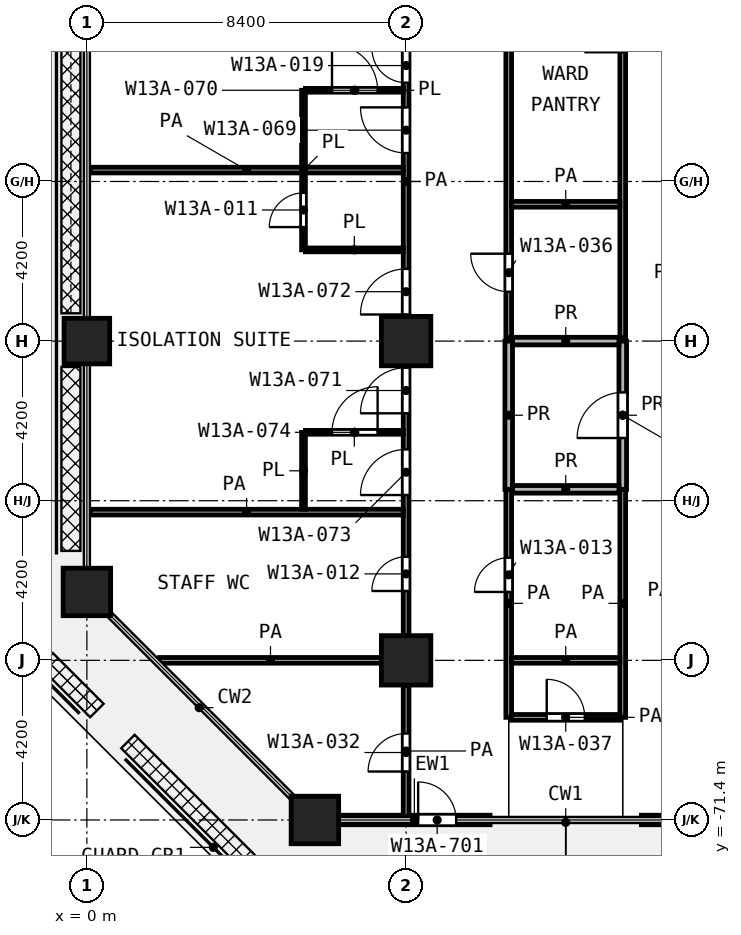
"""IFC4 building model, lengths in metres.
Left out: names, types, materials, properties, quantities, classifications, styles, units other than length and angle.
Written with IfcOpenShell. Run it as: python <this file> out.ifc"""

import sys

from ifc_helpers import new_model, si_unit, direction, frame, frame_2d, origin, origin_2d, place, context, subcontext, project, spatial, rectangle, extrude, element, fill, save


model = new_model("IFC4")
c1 = context("Model", 3, precision=1e-05, world=origin(), true_north=direction((0.0, 1.0)))
c2 = subcontext(c1, "Body", "Model", "MODEL_VIEW")
j1 = project(units=[si_unit("LENGTHUNIT", "METRE"), si_unit("PLANEANGLEUNIT", "RADIAN")], contexts=[c1])
p1 = place(None, origin())
s1 = spatial("IfcSite", under=j1, at=p1, CompositionType="ELEMENT")
p2 = place(p1, origin())
s2 = spatial("IfcBuilding", under=s1, at=p2, CompositionType="ELEMENT")
p3 = place(p2, frame((0.0, 0.0, 60.2)))
s3 = spatial("IfcBuildingStorey", under=s2, at=p3, CompositionType="ELEMENT", Elevation=60.2)
p4 = place(p3, frame((0.0, -58.8, 0.0), z_axis=(0.0, 0.0, 1.0), x_axis=(1.0, 0.0, 0.0)))
e1 = element("IfcColumn", 1, at=p4, inside=s3, PredefinedType="COLUMN", context=c2, shape_type="SweptSolid", body=[
    extrude(rectangle(XDim=1.2, YDim=1.2, at=origin_2d()), origin(), (0.0, 0.0, 1.0), 4.2),
])
p5 = place(p3, frame((8.4, -58.8, 0.0), z_axis=(0.0, 0.0, 1.0), x_axis=(1.0, 0.0, 0.0)))
e2 = element("IfcColumn", 2, at=p5, inside=s3, PredefinedType="COLUMN", context=c2, shape_type="SweptSolid", body=[
    extrude(rectangle(XDim=1.3, YDim=1.3, at=origin_2d()), origin(), (0.0, 0.0, 1.0), 4.2),
])
p6 = place(p3, frame((0.0, -65.4, 0.0), z_axis=(0.0, 0.0, 1.0), x_axis=(1.0, 0.0, 0.0)))
e3 = element("IfcColumn", 3, at=p6, inside=s3, PredefinedType="COLUMN", context=c2, shape_type="SweptSolid", body=[
    extrude(rectangle(XDim=1.25, YDim=1.25, at=origin_2d()), origin(), (0.0, 0.0, 1.0), 4.2),
])
p7 = place(p3, frame((8.4, -67.2, 0.0), z_axis=(0.0, 0.0, 1.0), x_axis=(1.0, 0.0, 0.0)))
e4 = element("IfcColumn", 4, at=p7, inside=s3, PredefinedType="COLUMN", context=c2, shape_type="SweptSolid", body=[
    extrude(rectangle(XDim=1.3, YDim=1.3, at=origin_2d()), origin(), (0.0, 0.0, 1.0), 4.2),
])
p8 = place(p3, frame((6.0, -71.4, 0.0), z_axis=(0.0, 0.0, 1.0), x_axis=(1.0, 0.0, 0.0)))
e5 = element("IfcColumn", 5, at=p8, inside=s3, PredefinedType="COLUMN", context=c2, shape_type="SweptSolid", body=[
    extrude(rectangle(XDim=1.25, YDim=1.25, at=origin_2d()), origin(), (0.0, 0.0, 1.0), 4.2),
])
p9 = place(p3, frame((6.625, -71.4, 0.0), z_axis=(0.0, 0.0, 1.0), x_axis=(1.0, 0.0, 0.0)))
e6 = element("IfcWall", 6, at=p9, inside=s3, PredefinedType="SOLIDWALL", context=c2, shape_type="SweptSolid", body=[
    extrude(rectangle(XDim=3.983, YDim=0.25, at=frame_2d((1.992, 0.0))), origin(), (0.0, 0.0, 1.0), 3.78),
])
p10 = place(p9, frame((2.092, 0.0, 0.0)))
e7 = element("IfcOpeningElement", 7, at=p10, cuts=e6, PredefinedType="OPENING", context=c2, shape_type="SweptSolid", body=[
    extrude(rectangle(XDim=1.0, YDim=2.1, at=frame_2d((0.5, 1.05))), frame((0.0, 0.135, 0.0), z_axis=(0.0, -1.0, 0.0), x_axis=(1.0, 0.0, 0.0)), (0.0, 0.0, 1.0), 0.27),
])
p11 = place(p3, frame((14.592, -71.4, 0.0), z_axis=(0.0, 0.0, 1.0), x_axis=(1.0, 0.0, 0.0)))
e8 = element("IfcWall", 8, at=p11, inside=s3, PredefinedType="SOLIDWALL", context=c2, shape_type="SweptSolid", body=[
    extrude(rectangle(XDim=3.983, YDim=0.25, at=frame_2d((1.992, 0.0))), origin(), (0.0, 0.0, 1.0), 3.78),
])
p12 = place(p11, frame((0.892, 0.0, 0.0)))
e9 = element("IfcOpeningElement", 9, at=p12, cuts=e8, PredefinedType="OPENING", context=c2, shape_type="SweptSolid", body=[
    extrude(rectangle(XDim=1.0, YDim=2.1, at=frame_2d((0.5, 1.05))), frame((0.0, 0.135, 0.0), z_axis=(0.0, -1.0, 0.0), x_axis=(1.0, 0.0, 0.0)), (0.0, 0.0, 1.0), 0.27),
])
p13 = place(p3, frame((5.75, -61.2, 0.0), z_axis=(0.0, 0.0, 1.0), x_axis=(1.0, 0.0, 0.0)))
e10 = element("IfcWall", 10, at=p13, inside=s3, PredefinedType="PARTITIONING", context=c2, shape_type="SweptSolid", body=[
    extrude(rectangle(XDim=2.575, YDim=0.1, at=frame_2d((1.288, 0.0))), origin(), (0.0, 0.0, 1.0), 3.9),
])
p14 = place(p13, frame((0.7, 0.0, 0.0)))
e11 = element("IfcOpeningElement", 11, at=p14, cuts=e10, PredefinedType="OPENING", context=c2, shape_type="SweptSolid", body=[
    extrude(rectangle(XDim=1.2, YDim=2.1, at=frame_2d((0.6, 1.05))), frame((0.0, 0.06, 0.0), z_axis=(0.0, -1.0, 0.0), x_axis=(1.0, 0.0, 0.0)), (0.0, 0.0, 1.0), 0.12),
])
p15 = place(p3, frame((5.75, -56.4, 0.0), z_axis=(0.0, 0.0, 1.0), x_axis=(1.0, 0.0, 0.0)))
e12 = element("IfcWall", 12, at=p15, inside=s3, PredefinedType="PARTITIONING", context=c2, shape_type="SweptSolid", body=[
    extrude(rectangle(XDim=2.575, YDim=0.1, at=frame_2d((1.288, 0.0))), origin(), (0.0, 0.0, 1.0), 3.9),
])
p16 = place(p3, frame((5.75, -52.2, 0.0), z_axis=(0.0, 0.0, 1.0), x_axis=(1.0, 0.0, 0.0)))
e13 = element("IfcWall", 13, at=p16, inside=s3, PredefinedType="PARTITIONING", context=c2, shape_type="SweptSolid", body=[
    extrude(rectangle(XDim=2.575, YDim=0.1, at=frame_2d((1.288, 0.0))), origin(), (0.0, 0.0, 1.0), 3.9),
])
p17 = place(p16, frame((0.7, 0.0, 0.0)))
e14 = element("IfcOpeningElement", 14, at=p17, cuts=e13, PredefinedType="OPENING", context=c2, shape_type="SweptSolid", body=[
    extrude(rectangle(XDim=1.2, YDim=2.1, at=frame_2d((0.6, 1.05))), frame((0.0, 0.06, 0.0), z_axis=(0.0, -1.0, 0.0), x_axis=(1.0, 0.0, 0.0)), (0.0, 0.0, 1.0), 0.12),
])
p18 = place(p3, frame((5.7, -63.225, 0.0), z_axis=(0.0, 0.0, 1.0), x_axis=(0.0, 1.0, 0.0)))
e15 = element("IfcWall", 15, at=p18, inside=s3, PredefinedType="PARTITIONING", context=c2, shape_type="SweptSolid", body=[
    extrude(rectangle(XDim=2.025, YDim=0.1, at=frame_2d((1.013, 0.0))), origin(), (0.0, 0.0, 1.0), 3.9),
])
p19 = place(p3, frame((5.7, -56.4, 0.0), z_axis=(0.0, 0.0, 1.0), x_axis=(0.0, 1.0, 0.0)))
e16 = element("IfcWall", 16, at=p19, inside=s3, PredefinedType="PARTITIONING", context=c2, shape_type="SweptSolid", body=[
    extrude(rectangle(XDim=4.2, YDim=0.1, at=frame_2d((2.1, 0.0))), origin(), (0.0, 0.0, 1.0), 3.9),
])
p20 = place(p19, frame((0.6, 0.0, 0.0)))
e17 = element("IfcOpeningElement", 17, at=p20, cuts=e16, PredefinedType="OPENING", context=c2, shape_type="SweptSolid", body=[
    extrude(rectangle(XDim=0.9, YDim=2.1, at=frame_2d((0.45, 1.05))), frame((0.0, 0.06, 0.0), z_axis=(0.0, -1.0, 0.0), x_axis=(1.0, 0.0, 0.0)), (0.0, 0.0, 1.0), 0.12),
])
p21 = place(p3, frame((11.175, -68.7, 0.0), z_axis=(0.0, 0.0, 1.0), x_axis=(1.0, 0.0, 0.0)))
e18 = element("IfcWall", 18, at=p21, inside=s3, PredefinedType="PARTITIONING", context=c2, shape_type="SweptSolid", body=[
    extrude(rectangle(XDim=2.85, YDim=0.15, at=frame_2d((1.425, 0.0))), origin(), (0.0, 0.0, 1.0), 3.9),
])
p22 = place(p21, frame((0.925, 0.0, 0.0)))
e19 = element("IfcOpeningElement", 19, at=p22, cuts=e18, PredefinedType="OPENING", context=c2, shape_type="SweptSolid", body=[
    extrude(rectangle(XDim=1.0, YDim=2.1, at=frame_2d((0.5, 1.05))), frame((0.0, 0.085, 0.0), z_axis=(0.0, -1.0, 0.0), x_axis=(1.0, 0.0, 0.0)), (0.0, 0.0, 1.0), 0.17),
])
p23 = place(p3, frame((1.913, -67.2, 0.0), z_axis=(0.0, 0.0, 1.0), x_axis=(1.0, 0.0, 0.0)))
e20 = element("IfcWall", 20, at=p23, inside=s3, PredefinedType="PARTITIONING", context=c2, shape_type="SweptSolid", body=[
    extrude(rectangle(XDim=5.837, YDim=0.15, at=frame_2d((2.918, 0.0))), origin(), (0.0, 0.0, 1.0), 3.9),
])
p24 = place(p3, frame((11.175, -67.2, 0.0), z_axis=(0.0, 0.0, 1.0), x_axis=(1.0, 0.0, 0.0)))
e21 = element("IfcWall", 21, at=p24, inside=s3, PredefinedType="PARTITIONING", context=c2, shape_type="SweptSolid", body=[
    extrude(rectangle(XDim=2.85, YDim=0.15, at=frame_2d((1.425, 0.0))), origin(), (0.0, 0.0, 1.0), 3.9),
])
p25 = place(p3, frame((0.08, -63.3, 0.0), z_axis=(0.0, 0.0, 1.0), x_axis=(1.0, 0.0, 0.0)))
e22 = element("IfcWall", 22, at=p25, inside=s3, PredefinedType="PARTITIONING", context=c2, shape_type="SweptSolid", body=[
    extrude(rectangle(XDim=8.245, YDim=0.15, at=frame_2d((4.123, 0.0))), origin(), (0.0, 0.0, 1.0), 3.9),
])
p26 = place(p3, frame((11.175, -55.2, 0.0), z_axis=(0.0, 0.0, 1.0), x_axis=(1.0, 0.0, 0.0)))
e23 = element("IfcWall", 23, at=p26, inside=s3, PredefinedType="PARTITIONING", context=c2, shape_type="SweptSolid", body=[
    extrude(rectangle(XDim=2.85, YDim=0.15, at=frame_2d((1.425, 0.0))), origin(), (0.0, 0.0, 1.0), 3.9),
])
p27 = place(p3, frame((0.08, -54.3, 0.0), z_axis=(0.0, 0.0, 1.0), x_axis=(1.0, 0.0, 0.0)))
e24 = element("IfcWall", 24, at=p27, inside=s3, PredefinedType="PARTITIONING", context=c2, shape_type="SweptSolid", body=[
    extrude(rectangle(XDim=8.245, YDim=0.15, at=frame_2d((4.123, 0.0))), origin(), (0.0, 0.0, 1.0), 3.9),
])
p28 = place(p3, frame((8.4, -71.32, 0.0), z_axis=(0.0, 0.0, 1.0), x_axis=(0.0, 1.0, 0.0)))
e25 = element("IfcWall", 25, at=p28, inside=s3, PredefinedType="PARTITIONING", context=c2, shape_type="SweptSolid", body=[
    extrude(rectangle(XDim=3.47, YDim=0.15, at=frame_2d((1.735, 0.0))), origin(), (0.0, 0.0, 1.0), 3.9),
])
p29 = place(p28, frame((1.195, 0.0, 0.0)))
e26 = element("IfcOpeningElement", 26, at=p29, cuts=e25, PredefinedType="OPENING", context=c2, shape_type="SweptSolid", body=[
    extrude(rectangle(XDim=1.0, YDim=2.1, at=frame_2d((0.5, 1.05))), frame((0.0, 0.085, 0.0), z_axis=(0.0, -1.0, 0.0), x_axis=(1.0, 0.0, 0.0)), (0.0, 0.0, 1.0), 0.17),
])
p30 = place(p3, frame((8.4, -66.55, 0.0), z_axis=(0.0, 0.0, 1.0), x_axis=(0.0, 1.0, 0.0)))
e27 = element("IfcWall", 27, at=p30, inside=s3, PredefinedType="PARTITIONING", context=c2, shape_type="SweptSolid", body=[
    extrude(rectangle(XDim=23.9, YDim=0.15, at=frame_2d((11.95, 0.0))), origin(), (0.0, 0.0, 1.0), 3.9),
])
p31 = place(p30, frame((14.55, 0.0, 0.0)))
e28 = element("IfcOpeningElement", 28, at=p31, cuts=e27, PredefinedType="OPENING", context=c2, shape_type="SweptSolid", body=[
    extrude(rectangle(XDim=0.9, YDim=2.1, at=frame_2d((0.45, 1.05))), frame((0.0, 0.085, 0.0), z_axis=(0.0, -1.0, 0.0), x_axis=(1.0, 0.0, 0.0)), (0.0, 0.0, 1.0), 0.17),
])
p32 = place(p30, frame((12.7, 0.0, 0.0)))
e29 = element("IfcOpeningElement", 29, at=p32, cuts=e27, PredefinedType="OPENING", context=c2, shape_type="SweptSolid", body=[
    extrude(rectangle(XDim=1.2, YDim=2.1, at=frame_2d((0.6, 1.05))), frame((0.0, 0.085, 0.0), z_axis=(0.0, -1.0, 0.0), x_axis=(1.0, 0.0, 0.0)), (0.0, 0.0, 1.0), 0.17),
])
p33 = place(p30, frame((5.85, 0.0, 0.0)))
e30 = element("IfcOpeningElement", 30, at=p33, cuts=e27, PredefinedType="OPENING", context=c2, shape_type="SweptSolid", body=[
    extrude(rectangle(XDim=1.2, YDim=2.1, at=frame_2d((0.6, 1.05))), frame((0.0, 0.085, 0.0), z_axis=(0.0, -1.0, 0.0), x_axis=(1.0, 0.0, 0.0)), (0.0, 0.0, 1.0), 0.17),
])
p34 = place(p30, frame((8.45, 0.0, 0.0)))
e31 = element("IfcOpeningElement", 31, at=p34, cuts=e27, PredefinedType="OPENING", context=c2, shape_type="SweptSolid", body=[
    extrude(rectangle(XDim=1.2, YDim=2.1, at=frame_2d((0.6, 1.05))), frame((0.0, 0.085, 0.0), z_axis=(0.0, -1.0, 0.0), x_axis=(1.0, 0.0, 0.0)), (0.0, 0.0, 1.0), 0.17),
])
p35 = place(p30, frame((3.7, 0.0, 0.0)))
e32 = element("IfcOpeningElement", 32, at=p35, cuts=e27, PredefinedType="OPENING", context=c2, shape_type="SweptSolid", body=[
    extrude(rectangle(XDim=1.2, YDim=2.1, at=frame_2d((0.6, 1.05))), frame((0.0, 0.085, 0.0), z_axis=(0.0, -1.0, 0.0), x_axis=(1.0, 0.0, 0.0)), (0.0, 0.0, 1.0), 0.17),
])
p36 = place(p30, frame((1.175, 0.0, 0.0)))
e33 = element("IfcOpeningElement", 33, at=p36, cuts=e27, PredefinedType="OPENING", context=c2, shape_type="SweptSolid", body=[
    extrude(rectangle(XDim=0.9, YDim=2.1, at=frame_2d((0.45, 1.05))), frame((0.0, 0.085, 0.0), z_axis=(0.0, -1.0, 0.0), x_axis=(1.0, 0.0, 0.0)), (0.0, 0.0, 1.0), 0.17),
])
p37 = place(p3, frame((11.1, -68.7, 0.0), z_axis=(0.0, 0.0, 1.0), x_axis=(0.0, 1.0, 0.0)))
e34 = element("IfcWall", 34, at=p37, inside=s3, PredefinedType="PARTITIONING", context=c2, shape_type="SweptSolid", body=[
    extrude(rectangle(XDim=6.0, YDim=0.15, at=frame_2d((3.0, 0.0))), origin(), (0.0, 0.0, 1.0), 3.9),
])
p38 = place(p37, frame((3.3, 0.0, 0.0)))
e35 = element("IfcOpeningElement", 35, at=p38, cuts=e34, PredefinedType="OPENING", context=c2, shape_type="SweptSolid", body=[
    extrude(rectangle(XDim=0.9, YDim=2.1, at=frame_2d((0.45, 1.05))), frame((0.0, 0.085, 0.0), z_axis=(0.0, -1.0, 0.0), x_axis=(1.0, 0.0, 0.0)), (0.0, 0.0, 1.0), 0.17),
])
p39 = place(p3, frame((11.1, -58.7, 0.0), z_axis=(0.0, 0.0, 1.0), x_axis=(0.0, 1.0, 0.0)))
e36 = element("IfcWall", 36, at=p39, inside=s3, PredefinedType="PARTITIONING", context=c2, shape_type="SweptSolid", body=[
    extrude(rectangle(XDim=29.3, YDim=0.15, at=frame_2d((14.65, 0.0))), origin(), (0.0, 0.0, 1.0), 3.9),
])
p40 = place(p39, frame((24.9, 0.0, 0.0)))
e37 = element("IfcOpeningElement", 37, at=p40, cuts=e36, PredefinedType="OPENING", context=c2, shape_type="SweptSolid", body=[
    extrude(rectangle(XDim=1.0, YDim=2.1, at=frame_2d((0.5, 1.05))), frame((0.0, 0.085, 0.0), z_axis=(0.0, -1.0, 0.0), x_axis=(1.0, 0.0, 0.0)), (0.0, 0.0, 1.0), 0.17),
])
p41 = place(p39, frame((18.6, 0.0, 0.0)))
e38 = element("IfcOpeningElement", 38, at=p41, cuts=e36, PredefinedType="OPENING", context=c2, shape_type="SweptSolid", body=[
    extrude(rectangle(XDim=1.0, YDim=2.1, at=frame_2d((0.5, 1.05))), frame((0.0, 0.085, 0.0), z_axis=(0.0, -1.0, 0.0), x_axis=(1.0, 0.0, 0.0)), (0.0, 0.0, 1.0), 0.17),
])
p42 = place(p39, frame((14.1, 0.0, 0.0)))
e39 = element("IfcOpeningElement", 39, at=p42, cuts=e36, PredefinedType="OPENING", context=c2, shape_type="SweptSolid", body=[
    extrude(rectangle(XDim=1.0, YDim=2.1, at=frame_2d((0.5, 1.05))), frame((0.0, 0.085, 0.0), z_axis=(0.0, -1.0, 0.0), x_axis=(1.0, 0.0, 0.0)), (0.0, 0.0, 1.0), 0.17),
])
p43 = place(p39, frame((1.2, 0.0, 0.0)))
e40 = element("IfcOpeningElement", 40, at=p43, cuts=e36, PredefinedType="OPENING", context=c2, shape_type="SweptSolid", body=[
    extrude(rectangle(XDim=1.0, YDim=2.1, at=frame_2d((0.5, 1.05))), frame((0.0, 0.085, 0.0), z_axis=(0.0, -1.0, 0.0), x_axis=(1.0, 0.0, 0.0)), (0.0, 0.0, 1.0), 0.17),
])
p44 = place(p3, frame((14.1, -68.7, 0.0), z_axis=(0.0, 0.0, 1.0), x_axis=(0.0, 1.0, 0.0)))
e41 = element("IfcWall", 41, at=p44, inside=s3, PredefinedType="PARTITIONING", context=c2, shape_type="SweptSolid", body=[
    extrude(rectangle(XDim=6.0, YDim=0.15, at=frame_2d((3.0, 0.0))), origin(), (0.0, 0.0, 1.0), 3.9),
])
p45 = place(p3, frame((14.1, -58.7, 0.0), z_axis=(0.0, 0.0, 1.0), x_axis=(0.0, 1.0, 0.0)))
e42 = element("IfcWall", 42, at=p45, inside=s3, PredefinedType="PARTITIONING", context=c2, shape_type="SweptSolid", body=[
    extrude(rectangle(XDim=29.3, YDim=0.15, at=frame_2d((14.65, 0.0))), origin(), (0.0, 0.0, 1.0), 3.9),
])
p46 = place(p45, frame((7.5, 0.0, 0.0)))
e43 = element("IfcOpeningElement", 43, at=p46, cuts=e42, PredefinedType="OPENING", context=c2, shape_type="SweptSolid", body=[
    extrude(rectangle(XDim=1.0, YDim=2.1, at=frame_2d((0.5, 1.05))), frame((0.0, 0.085, 0.0), z_axis=(0.0, -1.0, 0.0), x_axis=(1.0, 0.0, 0.0)), (0.0, 0.0, 1.0), 0.17),
])
for number, where, z_axis, x_axis in (
    (44, (11.2, -62.7, 0.0), (0.0, 0.0, 1.0), (1.0, 0.0, 0.0)),
    (45, (11.2, -58.8, 0.0), (0.0, 0.0, 1.0), (1.0, 0.0, 0.0)),
):
    element("IfcWall", number, at=place(p3, frame(where, z_axis=z_axis, x_axis=x_axis)), inside=s3, PredefinedType="PARTITIONING", context=c2, shape_type="SweptSolid", body=[
        extrude(rectangle(XDim=2.8, YDim=0.2, at=frame_2d((1.4, 0.0))), origin(), (0.0, 0.0, 1.0), 3.9),
    ])
p47 = place(p3, frame((11.1, -62.7, 0.0), z_axis=(0.0, 0.0, 1.0), x_axis=(0.0, 1.0, 0.0)))
e46 = element("IfcWall", 46, at=p47, inside=s3, PredefinedType="PARTITIONING", context=c2, shape_type="SweptSolid", body=[
    extrude(rectangle(XDim=3.9, YDim=0.2, at=frame_2d((1.95, 0.0))), origin(), (0.0, 0.0, 1.0), 3.9),
])
p48 = place(p3, frame((14.1, -62.7, 0.0), z_axis=(0.0, 0.0, 1.0), x_axis=(0.0, 1.0, 0.0)))
e47 = element("IfcWall", 47, at=p48, inside=s3, PredefinedType="PARTITIONING", context=c2, shape_type="SweptSolid", body=[
    extrude(rectangle(XDim=3.9, YDim=0.2, at=frame_2d((1.95, 0.0))), origin(), (0.0, 0.0, 1.0), 3.9),
])
p49 = place(p48, frame((1.35, 0.0, 0.0)))
e48 = element("IfcOpeningElement", 48, at=p49, cuts=e47, PredefinedType="OPENING", context=c2, shape_type="SweptSolid", body=[
    extrude(rectangle(XDim=1.2, YDim=2.1, at=frame_2d((0.6, 1.05))), frame((0.0, 0.11, 0.0), z_axis=(0.0, -1.0, 0.0), x_axis=(1.0, 0.0, 0.0)), (0.0, 0.0, 1.0), 0.22),
])
p50 = place(p10, origin())
e49 = element("IfcDoor", 49, at=p50, inside=s3, OperationType="SINGLE_SWING_LEFT", PredefinedType="DOOR", context=c2, shape_type="SweptSolid", body=[
    extrude(rectangle(XDim=1.0, YDim=2.1, at=frame_2d((0.5, 1.05))), frame((0.0, 0.025, 0.0), z_axis=(0.0, -1.0, 0.0), x_axis=(1.0, 0.0, 0.0)), (0.0, 0.0, 1.0), 0.05),
])
fill(e7, e49)
p51 = place(p31, origin())
e50 = element("IfcDoor", 50, at=p51, inside=s3, OperationType="SINGLE_SWING_RIGHT", PredefinedType="DOOR", context=c2, shape_type="SweptSolid", body=[
    extrude(rectangle(XDim=0.9, YDim=2.1, at=frame_2d((0.45, 1.05))), frame((0.0, 0.025, 0.0), z_axis=(0.0, -1.0, 0.0), x_axis=(1.0, 0.0, 0.0)), (0.0, 0.0, 1.0), 0.05),
])
fill(e28, e50)
p52 = place(p32, origin())
e51 = element("IfcDoor", 51, at=p52, inside=s3, OperationType="SINGLE_SWING_RIGHT", PredefinedType="DOOR", context=c2, shape_type="SweptSolid", body=[
    extrude(rectangle(XDim=1.2, YDim=2.1, at=frame_2d((0.6, 1.05))), frame((0.0, 0.025, 0.0), z_axis=(0.0, -1.0, 0.0), x_axis=(1.0, 0.0, 0.0)), (0.0, 0.0, 1.0), 0.05),
])
fill(e29, e51)
p53 = place(p17, origin())
e52 = element("IfcDoor", 52, at=p53, inside=s3, OperationType="SINGLE_SWING_LEFT", PredefinedType="DOOR", context=c2, shape_type="SweptSolid", body=[
    extrude(rectangle(XDim=1.2, YDim=2.1, at=frame_2d((0.6, 1.05))), frame((0.0, 0.025, 0.0), z_axis=(0.0, -1.0, 0.0), x_axis=(1.0, 0.0, 0.0)), (0.0, 0.0, 1.0), 0.05),
])
fill(e14, e52)
p54 = place(p33, origin())
e53 = element("IfcDoor", 53, at=p54, inside=s3, OperationType="SINGLE_SWING_LEFT", PredefinedType="DOOR", context=c2, shape_type="SweptSolid", body=[
    extrude(rectangle(XDim=1.2, YDim=2.1, at=frame_2d((0.6, 1.05))), frame((0.0, 0.025, 0.0), z_axis=(0.0, -1.0, 0.0), x_axis=(1.0, 0.0, 0.0)), (0.0, 0.0, 1.0), 0.05),
])
fill(e30, e53)
p55 = place(p34, origin())
e54 = element("IfcDoor", 54, at=p55, inside=s3, OperationType="SINGLE_SWING_LEFT", PredefinedType="DOOR", context=c2, shape_type="SweptSolid", body=[
    extrude(rectangle(XDim=1.2, YDim=2.1, at=frame_2d((0.6, 1.05))), frame((0.0, 0.025, 0.0), z_axis=(0.0, -1.0, 0.0), x_axis=(1.0, 0.0, 0.0)), (0.0, 0.0, 1.0), 0.05),
])
fill(e31, e54)
p56 = place(p35, origin())
e55 = element("IfcDoor", 55, at=p56, inside=s3, OperationType="SINGLE_SWING_LEFT", PredefinedType="DOOR", context=c2, shape_type="SweptSolid", body=[
    extrude(rectangle(XDim=1.2, YDim=2.1, at=frame_2d((0.6, 1.05))), frame((0.0, 0.025, 0.0), z_axis=(0.0, -1.0, 0.0), x_axis=(1.0, 0.0, 0.0)), (0.0, 0.0, 1.0), 0.05),
])
fill(e32, e55)
p57 = place(p14, origin())
e56 = element("IfcDoor", 56, at=p57, inside=s3, OperationType="SINGLE_SWING_RIGHT", PredefinedType="DOOR", context=c2, shape_type="SweptSolid", body=[
    extrude(rectangle(XDim=1.2, YDim=2.1, at=frame_2d((0.6, 1.05))), frame((0.0, 0.025, 0.0), z_axis=(0.0, -1.0, 0.0), x_axis=(1.0, 0.0, 0.0)), (0.0, 0.0, 1.0), 0.05),
])
fill(e11, e56)
p58 = place(p20, origin())
e57 = element("IfcDoor", 57, at=p58, inside=s3, OperationType="SINGLE_SWING_LEFT", PredefinedType="DOOR", context=c2, shape_type="SweptSolid", body=[
    extrude(rectangle(XDim=0.9, YDim=2.1, at=frame_2d((0.45, 1.05))), frame((0.0, 0.025, 0.0), z_axis=(0.0, -1.0, 0.0), x_axis=(1.0, 0.0, 0.0)), (0.0, 0.0, 1.0), 0.05),
])
fill(e17, e57)
p59 = place(p36, origin())
e58 = element("IfcDoor", 58, at=p59, inside=s3, OperationType="SINGLE_SWING_LEFT", PredefinedType="DOOR", context=c2, shape_type="SweptSolid", body=[
    extrude(rectangle(XDim=0.9, YDim=2.1, at=frame_2d((0.45, 1.05))), frame((0.0, 0.025, 0.0), z_axis=(0.0, -1.0, 0.0), x_axis=(1.0, 0.0, 0.0)), (0.0, 0.0, 1.0), 0.05),
])
fill(e33, e58)
p60 = place(p29, origin())
e59 = element("IfcDoor", 59, at=p60, inside=s3, OperationType="SINGLE_SWING_LEFT", PredefinedType="DOOR", context=c2, shape_type="SweptSolid", body=[
    extrude(rectangle(XDim=1.0, YDim=2.1, at=frame_2d((0.5, 1.05))), frame((0.0, 0.025, 0.0), z_axis=(0.0, -1.0, 0.0), x_axis=(1.0, 0.0, 0.0)), (0.0, 0.0, 1.0), 0.05),
])
fill(e26, e59)
p61 = place(p43, origin())
e60 = element("IfcDoor", 60, at=p61, inside=s3, OperationType="SINGLE_SWING_RIGHT", PredefinedType="DOOR", context=c2, shape_type="SweptSolid", body=[
    extrude(rectangle(XDim=1.0, YDim=2.1, at=frame_2d((0.5, 1.05))), frame((0.0, 0.025, 0.0), z_axis=(0.0, -1.0, 0.0), x_axis=(1.0, 0.0, 0.0)), (0.0, 0.0, 1.0), 0.05),
])
fill(e40, e60)
p62 = place(p49, origin())
e61 = element("IfcDoor", 61, at=p62, inside=s3, OperationType="SINGLE_SWING_LEFT", PredefinedType="DOOR", context=c2, shape_type="SweptSolid", body=[
    extrude(rectangle(XDim=1.2, YDim=2.1, at=frame_2d((0.6, 1.05))), frame((0.0, 0.025, 0.0), z_axis=(0.0, -1.0, 0.0), x_axis=(1.0, 0.0, 0.0)), (0.0, 0.0, 1.0), 0.05),
])
fill(e48, e61)
p63 = place(p38, origin())
e62 = element("IfcDoor", 62, at=p63, inside=s3, OperationType="SINGLE_SWING_LEFT", PredefinedType="DOOR", context=c2, shape_type="SweptSolid", body=[
    extrude(rectangle(XDim=0.9, YDim=2.1, at=frame_2d((0.45, 1.05))), frame((0.0, 0.025, 0.0), z_axis=(0.0, -1.0, 0.0), x_axis=(1.0, 0.0, 0.0)), (0.0, 0.0, 1.0), 0.05),
])
fill(e35, e62)
p64 = place(p22, origin())
e63 = element("IfcDoor", 63, at=p64, inside=s3, OperationType="SINGLE_SWING_LEFT", PredefinedType="DOOR", context=c2, shape_type="SweptSolid", body=[
    extrude(rectangle(XDim=1.0, YDim=2.1, at=frame_2d((0.5, 1.05))), frame((0.0, 0.025, 0.0), z_axis=(0.0, -1.0, 0.0), x_axis=(1.0, 0.0, 0.0)), (0.0, 0.0, 1.0), 0.05),
])
fill(e19, e63)
save(model, sys.argv[1])
